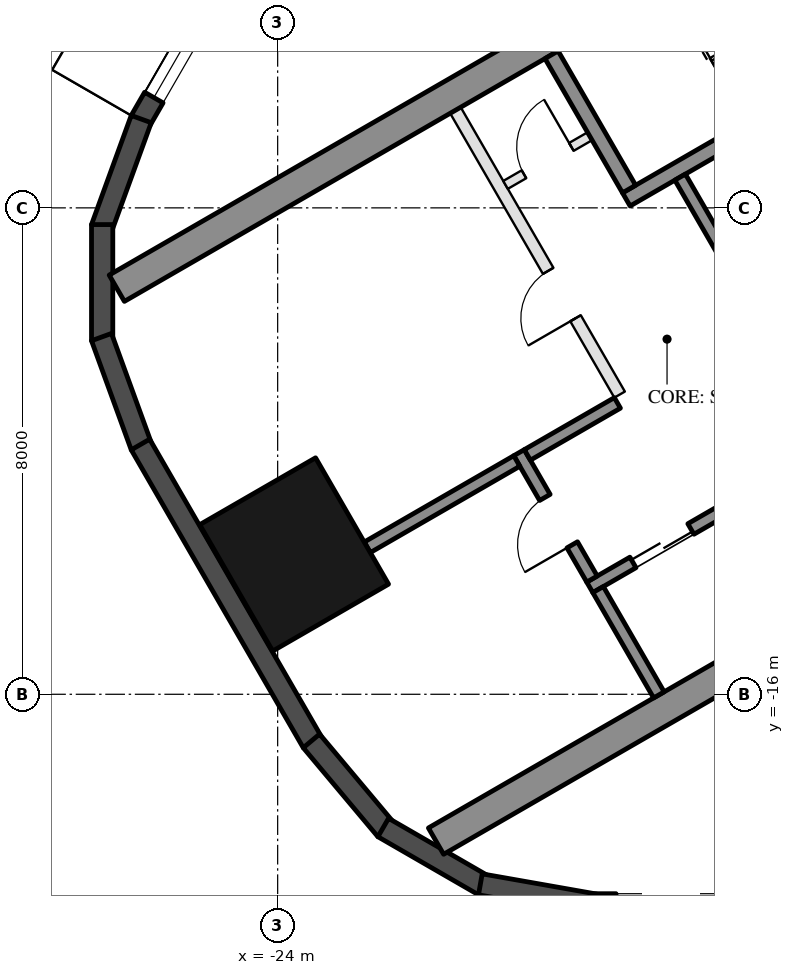
"""IFC4 building model, lengths in metres.
Left out: names, types, materials, properties, quantities, classifications, styles, units other than length and angle.
Written with IfcOpenShell. Run it as: python <this file> out.ifc"""

import sys

from ifc_helpers import new_model, si_unit, direction, frame, frame_2d, origin, origin_2d, place, context, subcontext, project, spatial, rectangle, hollow_rectangle, extrude, element, fill, save


model = new_model("IFC4")
c1 = context("Model", 3, precision=1e-05, world=origin(), true_north=direction((0.0, 1.0)))
c2 = subcontext(c1, "Body", "Model", "MODEL_VIEW")
j1 = project(units=[si_unit("LENGTHUNIT", "METRE"), si_unit("PLANEANGLEUNIT", "RADIAN")], contexts=[c1])
p1 = place(None, origin())
s1 = spatial("IfcSite", under=j1, at=p1, CompositionType="ELEMENT")
p2 = place(p1, origin())
s2 = spatial("IfcBuilding", under=s1, at=p2, CompositionType="ELEMENT")
p3 = place(p2, frame((0.0, 0.0, 176.2)))
s3 = spatial("IfcBuildingStorey", under=s2, at=p3, CompositionType="ELEMENT", Elevation=176.2)
p4 = place(p3, frame((-23.729, -13.7, 0.0), z_axis=(0.0, 0.0, 1.0), x_axis=(-0.5, 0.866025403784, 0.0)))
e1 = element("IfcColumn", 1, at=p4, inside=s3, PredefinedType="COLUMN", context=c2, shape_type="SweptSolid", body=[
    extrude(hollow_rectangle(XDim=2.4, YDim=2.2, WallThickness=0.06, at=origin_2d()), origin(), (0.0, 0.0, 1.0), 3.7),
])
p5 = place(p3, frame((-24.299, -3.176, 0.0), z_axis=(0.0, 0.0, 1.0), x_axis=(-0.500028278809, -0.866009076391, 0.0)))
e2 = element("IfcWall", 2, at=p5, inside=s3, PredefinedType="SOLIDWALL", context=c2, shape_type="SweptSolid", body=[
    extrude(rectangle(XDim=3.916, YDim=0.35, at=frame_2d((1.958, 0.0))), origin(), (0.0, 0.0, 1.0), 3.55),
])
p6 = place(p5, frame((1.675, 0.0, 0.3)))
e3 = element("IfcOpeningElement", 3, at=p6, cuts=e2, PredefinedType="OPENING", context=c2, shape_type="SweptSolid", body=[
    extrude(rectangle(XDim=1.8, YDim=2.65, at=frame_2d((0.9, 1.325))), frame((0.0, 0.185, 0.0), z_axis=(0.0, -1.0, 0.0), x_axis=(1.0, 0.0, 0.0)), (0.0, 0.0, 1.0), 0.37),
])
for number, where, z_axis, x_axis in (
    (4, (-26.244, -6.54, 0.0), (0.0, 0.0, 1.0), (-0.342, -0.94, 0.0)),
    (5, (-26.886, -8.275, 0.0), (0.0, 0.0, 1.0), (0.0, -1.0, 0.0)),
    (6, (-26.897, -10.125, 0.0), (0.0, 0.0, 1.0), (0.342, -0.94, 0.0)),
):
    element("IfcWall", number, at=place(p3, frame(where, z_axis=z_axis, x_axis=x_axis)), inside=s3, PredefinedType="SOLIDWALL", context=c2, shape_type="SweptSolid", body=[
        extrude(rectangle(XDim=1.91, YDim=0.35, at=frame_2d((0.955, 0.0))), origin(), (0.0, 0.0, 1.0), 3.55),
    ])
p7 = place(p3, frame((-26.257, -11.893, 0.0), z_axis=(0.0, 0.0, 1.0), x_axis=(0.500018773155, -0.866014564827, 0.0)))
e7 = element("IfcWall", 7, at=p7, inside=s3, PredefinedType="SOLIDWALL", context=c2, shape_type="SweptSolid", body=[
    extrude(rectangle(XDim=5.658, YDim=0.35, at=frame_2d((2.829, 0.0))), origin(), (0.0, 0.0, 1.0), 3.55),
])
for number, where, z_axis, x_axis in (
    (8, (-23.445, -16.768, 0.0), (0.0, 0.0, 1.0), (0.643, -0.766, 0.0)),
    (9, (-22.264, -18.192, 0.0), (0.0, 0.0, 1.0), (0.866, -0.5, 0.0)),
):
    element("IfcWall", number, at=place(p3, frame(where, z_axis=z_axis, x_axis=x_axis)), inside=s3, PredefinedType="SOLIDWALL", context=c2, shape_type="SweptSolid", body=[
        extrude(rectangle(XDim=1.91, YDim=0.35, at=frame_2d((0.955, 0.0))), origin(), (0.0, 0.0, 1.0), 3.55),
    ])
p8 = place(p3, frame((-20.667, -19.126, 0.0), z_axis=(0.0, 0.0, 1.0), x_axis=(0.984798995425, -0.173697837091, 0.0)))
e10 = element("IfcWall", 10, at=p8, inside=s3, PredefinedType="SOLIDWALL", context=c2, shape_type="SweptSolid", body=[
    extrude(rectangle(XDim=1.91, YDim=0.35, at=frame_2d((0.955, 0.0))), origin(), (0.0, 0.0, 1.0), 3.55),
])
p9 = place(p3, frame((-18.816, -19.455, 0.0), z_axis=(0.0, 0.0, 1.0), x_axis=(1.0, 0.0, 0.0)))
e11 = element("IfcWall", 11, at=p9, inside=s3, PredefinedType="SOLIDWALL", context=c2, shape_type="SweptSolid", body=[
    extrude(rectangle(XDim=11.816, YDim=0.35, at=frame_2d((5.908, 0.0))), origin(), (0.0, 0.0, 1.0), 3.55),
])
p10 = place(p9, frame((0.381, 0.0, 0.3)))
e12 = element("IfcOpeningElement", 12, at=p10, cuts=e11, PredefinedType="OPENING", context=c2, shape_type="SweptSolid", body=[
    extrude(rectangle(XDim=1.8, YDim=2.65, at=frame_2d((0.9, 1.325))), frame((0.0, 0.185, 0.0), z_axis=(0.0, -1.0, 0.0), x_axis=(1.0, 0.0, 0.0)), (0.0, 0.0, 1.0), 0.37),
])
p11 = place(p9, frame((7.74, 0.0, 0.0)))
e13 = element("IfcOpeningElement", 13, at=p11, cuts=e11, PredefinedType="OPENING", context=c2, shape_type="SweptSolid", body=[
    extrude(rectangle(XDim=2.4, YDim=2.4, at=frame_2d((1.2, 1.2))), frame((0.0, 0.185, 0.0), z_axis=(0.0, -1.0, 0.0), x_axis=(1.0, 0.0, 0.0)), (0.0, 0.0, 1.0), 0.37),
])
p12 = place(p9, frame((3.791, 0.0, 0.3)))
e14 = element("IfcOpeningElement", 14, at=p12, cuts=e11, PredefinedType="OPENING", context=c2, shape_type="SweptSolid", body=[
    extrude(rectangle(XDim=1.6, YDim=2.65, at=frame_2d((0.8, 1.325))), frame((0.0, 0.185, 0.0), z_axis=(0.0, -1.0, 0.0), x_axis=(1.0, 0.0, 0.0)), (0.0, 0.0, 1.0), 0.37),
])
p13 = place(p9, frame((5.691, 0.0, 0.3)))
e15 = element("IfcOpeningElement", 15, at=p13, cuts=e11, PredefinedType="OPENING", context=c2, shape_type="SweptSolid", body=[
    extrude(rectangle(XDim=1.6, YDim=2.65, at=frame_2d((0.8, 1.325))), frame((0.0, 0.185, 0.0), z_axis=(0.0, -1.0, 0.0), x_axis=(1.0, 0.0, 0.0)), (0.0, 0.0, 1.0), 0.37),
])
for number, where, z_axis, x_axis in (
    (16, (-13.797, -1.903, 0.0), (0.0, 0.0, 1.0), (-0.866, -0.5, 0.0)),
    (17, (-8.547, -10.997, 0.0), (0.0, 0.0, 1.0), (-0.866, -0.5, 0.0)),
):
    element("IfcWall", number, at=place(p3, frame(where, z_axis=z_axis, x_axis=x_axis)), inside=s3, PredefinedType="SHEAR", context=c2, shape_type="SweptSolid", body=[
        extrude(rectangle(XDim=14.837, YDim=0.5, at=frame_2d((7.418, 0.0))), origin(), (0.0, 0.0, 1.0), 3.5),
    ])
p14 = place(p3, frame((-12.681, -4.636, 0.0), z_axis=(0.0, 0.0, 1.0), x_axis=(-0.866021702275, -0.500006411147, 0.0)))
e18 = element("IfcWall", 18, at=p14, inside=s3, PredefinedType="SHEAR", context=c2, shape_type="SweptSolid", body=[
    extrude(rectangle(XDim=6.45, YDim=0.25, at=frame_2d((3.225, 0.0))), origin(), (0.0, 0.0, 1.0), 3.5),
])
p15 = place(p14, frame((0.3, 0.0, 0.0)))
e19 = element("IfcOpeningElement", 19, at=p15, cuts=e18, PredefinedType="OPENING", context=c2, shape_type="SweptSolid", body=[
    extrude(rectangle(XDim=1.0, YDim=2.1, at=frame_2d((0.5, 1.05))), frame((0.0, 0.135, 0.0), z_axis=(0.0, -1.0, 0.0), x_axis=(1.0, 0.0, 0.0)), (0.0, 0.0, 1.0), 0.27),
])
p16 = place(p3, frame((-19.496, -5.482, 0.0), z_axis=(0.0, 0.0, 1.0), x_axis=(0.499990435942, -0.866030925526, 0.0)))
e20 = element("IfcWall", 20, at=p16, inside=s3, PredefinedType="SHEAR", context=c2, shape_type="SweptSolid", body=[
    extrude(rectangle(XDim=2.55, YDim=0.25, at=frame_2d((1.275, 0.0))), origin(), (0.0, 0.0, 1.0), 3.5),
])
p17 = place(p3, frame((-17.381, -7.495, 0.0), z_axis=(0.0, 0.0, 1.0), x_axis=(0.500011755427, -0.866018616679, 0.0)))
e21 = element("IfcWall", 21, at=p17, inside=s3, PredefinedType="SHEAR", context=c2, shape_type="SweptSolid", body=[
    extrude(rectangle(XDim=2.8, YDim=0.2, at=frame_2d((1.4, 0.0))), origin(), (0.0, 0.0, 1.0), 3.5),
])
p18 = place(p3, frame((-10.068, -9.162, 0.0), z_axis=(0.0, 0.0, 1.0), x_axis=(-0.866032725843, -0.499987317609, 0.0)))
e22 = element("IfcWall", 22, at=p18, inside=s3, PredefinedType="SHEAR", context=c2, shape_type="SweptSolid", body=[
    extrude(rectangle(XDim=10.16, YDim=0.2, at=frame_2d((5.08, 0.0))), origin(), (0.0, 0.0, 1.0), 3.5),
])
p19 = place(p18, frame((0.62, 0.0, 0.0)))
e23 = element("IfcOpeningElement", 23, at=p19, cuts=e22, PredefinedType="OPENING", context=c2, shape_type="SweptSolid", body=[
    extrude(rectangle(XDim=1.1, YDim=2.1, at=frame_2d((0.55, 1.05))), frame((0.0, 0.11, 0.0), z_axis=(0.0, -1.0, 0.0), x_axis=(1.0, 0.0, 0.0)), (0.0, 0.0, 1.0), 0.22),
])
p20 = place(p18, frame((3.16, 0.0, 0.0)))
e24 = element("IfcOpeningElement", 24, at=p20, cuts=e22, PredefinedType="OPENING", context=c2, shape_type="SweptSolid", body=[
    extrude(rectangle(XDim=1.1, YDim=2.1, at=frame_2d((0.55, 1.05))), frame((0.0, 0.11, 0.0), z_axis=(0.0, -1.0, 0.0), x_axis=(1.0, 0.0, 0.0)), (0.0, 0.0, 1.0), 0.22),
])
p21 = place(p18, frame((5.7, 0.0, 0.0)))
e25 = element("IfcOpeningElement", 25, at=p21, cuts=e22, PredefinedType="OPENING", context=c2, shape_type="SweptSolid", body=[
    extrude(rectangle(XDim=1.1, YDim=2.1, at=frame_2d((0.55, 1.05))), frame((0.0, 0.11, 0.0), z_axis=(0.0, -1.0, 0.0), x_axis=(1.0, 0.0, 0.0)), (0.0, 0.0, 1.0), 0.22),
])
p22 = place(p18, frame((8.24, 0.0, 0.0)))
e26 = element("IfcOpeningElement", 26, at=p22, cuts=e22, PredefinedType="OPENING", context=c2, shape_type="SweptSolid", body=[
    extrude(rectangle(XDim=1.1, YDim=2.1, at=frame_2d((0.55, 1.05))), frame((0.0, 0.11, 0.0), z_axis=(0.0, -1.0, 0.0), x_axis=(1.0, 0.0, 0.0)), (0.0, 0.0, 1.0), 0.22),
])
p23 = place(p3, frame((-20.031, -12.026, 0.0), z_axis=(0.0, 0.0, 1.0), x_axis=(0.500033551112, -0.866006032174, 0.0)))
e27 = element("IfcWall", 27, at=p23, inside=s3, PredefinedType="SHEAR", context=c2, shape_type="SweptSolid", body=[
    extrude(rectangle(XDim=2.4, YDim=0.2, at=frame_2d((1.2, 0.0))), origin(), (0.0, 0.0, 1.0), 3.5),
])
p24 = place(p23, frame((0.85, 0.0, 0.0)))
e28 = element("IfcOpeningElement", 28, at=p24, cuts=e27, PredefinedType="OPENING", context=c2, shape_type="SweptSolid", body=[
    extrude(rectangle(XDim=0.9, YDim=2.1, at=frame_2d((0.45, 1.05))), frame((0.0, 0.11, 0.0), z_axis=(0.0, -1.0, 0.0), x_axis=(1.0, 0.0, 0.0)), (0.0, 0.0, 1.0), 0.22),
])
p25 = place(p3, frame((-18.413, -11.208, 0.0), z_axis=(0.0, 0.0, 1.0), x_axis=(-0.866038183914, -0.499977863513, 0.0)))
e29 = element("IfcWall", 29, at=p25, inside=s3, PredefinedType="SHEAR", context=c2, shape_type="SweptSolid", body=[
    extrude(rectangle(XDim=1.71, YDim=0.2, at=frame_2d((0.855, 0.0))), origin(), (0.0, 0.0, 1.0), 3.5),
])
p26 = place(p3, frame((-18.73, -14.278, 0.0), z_axis=(0.0, 0.0, 1.0), x_axis=(0.50002537861, -0.866010750942, 0.0)))
e30 = element("IfcWall", 30, at=p26, inside=s3, PredefinedType="SHEAR", context=c2, shape_type="SweptSolid", body=[
    extrude(rectangle(XDim=2.0, YDim=0.2, at=frame_2d((1.0, 0.0))), origin(), (0.0, 0.0, 1.0), 3.5),
])
p27 = place(p3, frame((-20.067, -12.163, 0.0), z_axis=(0.0, 0.0, 1.0), x_axis=(-0.866055327414, -0.49994816717, 0.0)))
e31 = element("IfcWall", 31, at=p27, inside=s3, PredefinedType="SHEAR", context=c2, shape_type="SweptSolid", body=[
    extrude(rectangle(XDim=2.84, YDim=0.2, at=frame_2d((1.42, 0.0))), origin(), (0.0, 0.0, 1.0), 3.5),
])
p28 = place(p3, frame((-21.076, -6.395, 0.0), z_axis=(0.0, 0.0, 1.0), x_axis=(0.50001468107, -0.866016927499, 0.0)))
e32 = element("IfcWall", 32, at=p28, inside=s3, PredefinedType="PARTITIONING", context=c2, shape_type="SweptSolid", body=[
    extrude(rectangle(XDim=5.4, YDim=0.2, at=frame_2d((2.7, 0.0))), origin(), (0.0, 0.0, 1.0), 3.5),
])
p29 = place(p28, frame((3.05, 0.0, 0.0)))
e33 = element("IfcOpeningElement", 33, at=p29, cuts=e32, PredefinedType="OPENING", context=c2, shape_type="SweptSolid", body=[
    extrude(rectangle(XDim=0.9, YDim=2.1, at=frame_2d((0.45, 1.05))), frame((0.0, 0.11, 0.0), z_axis=(0.0, -1.0, 0.0), x_axis=(1.0, 0.0, 0.0)), (0.0, 0.0, 1.0), 0.22),
])
p30 = place(p3, frame((-18.866, -6.822, 0.0), z_axis=(0.0, 0.0, 1.0), x_axis=(-0.866028054938, -0.499995408039, 0.0)))
e34 = element("IfcWall", 34, at=p30, inside=s3, PredefinedType="PARTITIONING", context=c2, shape_type="SweptSolid", body=[
    extrude(rectangle(XDim=1.6, YDim=0.15, at=frame_2d((0.8, 0.0))), origin(), (0.0, 0.0, 1.0), 3.5),
])
p31 = place(p30, frame((0.35, 0.0, 0.0)))
e35 = element("IfcOpeningElement", 35, at=p31, cuts=e34, PredefinedType="OPENING", context=c2, shape_type="SweptSolid", body=[
    extrude(rectangle(XDim=0.9, YDim=2.1, at=frame_2d((0.45, 1.05))), frame((0.0, 0.085, 0.0), z_axis=(0.0, -1.0, 0.0), x_axis=(1.0, 0.0, 0.0)), (0.0, 0.0, 1.0), 0.17),
])
p32 = place(p6, origin())
e36 = element("IfcWindow", 36, at=p32, inside=s3, PartitioningType="SINGLE_PANEL", PredefinedType="WINDOW", context=c2, shape_type="SweptSolid", body=[
    extrude(rectangle(XDim=1.8, YDim=2.65, at=frame_2d((0.9, 1.325))), frame((0.0, 0.03, 0.0), z_axis=(0.0, -1.0, 0.0), x_axis=(1.0, 0.0, 0.0)), (0.0, 0.0, 1.0), 0.06),
])
fill(e3, e36)
p33 = place(p31, frame((0.9, 0.0, 0.0), z_axis=(0.0, 0.0, 1.0), x_axis=(-1.0, 0.0, 0.0)))
e37 = element("IfcDoor", 37, at=p33, inside=s3, OperationType="SINGLE_SWING_RIGHT", PredefinedType="DOOR", context=c2, shape_type="SweptSolid", body=[
    extrude(rectangle(XDim=0.9, YDim=2.1, at=frame_2d((0.45, 1.05))), frame((0.0, 0.025, 0.0), z_axis=(0.0, -1.0, 0.0), x_axis=(1.0, 0.0, 0.0)), (0.0, 0.0, 1.0), 0.05),
])
fill(e35, e37)
p34 = place(p22, origin())
e38 = element("IfcDoor", 38, at=p34, inside=s3, OperationType="DOUBLE_DOOR_SLIDING", PredefinedType="DOOR", context=c2, shape_type="SweptSolid", body=[
    extrude(rectangle(XDim=1.1, YDim=2.1, at=frame_2d((0.55, 1.05))), frame((0.0, 0.025, 0.0), z_axis=(0.0, -1.0, 0.0), x_axis=(1.0, 0.0, 0.0)), (0.0, 0.0, 1.0), 0.05),
])
fill(e26, e38)
p35 = place(p24, frame((0.9, 0.0, 0.0), z_axis=(0.0, 0.0, 1.0), x_axis=(-1.0, 0.0, 0.0)))
e39 = element("IfcDoor", 39, at=p35, inside=s3, OperationType="SINGLE_SWING_LEFT", PredefinedType="DOOR", context=c2, shape_type="SweptSolid", body=[
    extrude(rectangle(XDim=0.9, YDim=2.1, at=frame_2d((0.45, 1.05))), frame((0.0, 0.025, 0.0), z_axis=(0.0, -1.0, 0.0), x_axis=(1.0, 0.0, 0.0)), (0.0, 0.0, 1.0), 0.05),
])
fill(e28, e39)
p36 = place(p29, frame((0.9, 0.0, 0.0), z_axis=(0.0, 0.0, 1.0), x_axis=(-1.0, 0.0, 0.0)))
e40 = element("IfcDoor", 40, at=p36, inside=s3, OperationType="SINGLE_SWING_LEFT", PredefinedType="DOOR", context=c2, shape_type="SweptSolid", body=[
    extrude(rectangle(XDim=0.9, YDim=2.1, at=frame_2d((0.45, 1.05))), frame((0.0, 0.025, 0.0), z_axis=(0.0, -1.0, 0.0), x_axis=(1.0, 0.0, 0.0)), (0.0, 0.0, 1.0), 0.05),
])
fill(e33, e40)
save(model, sys.argv[1])
